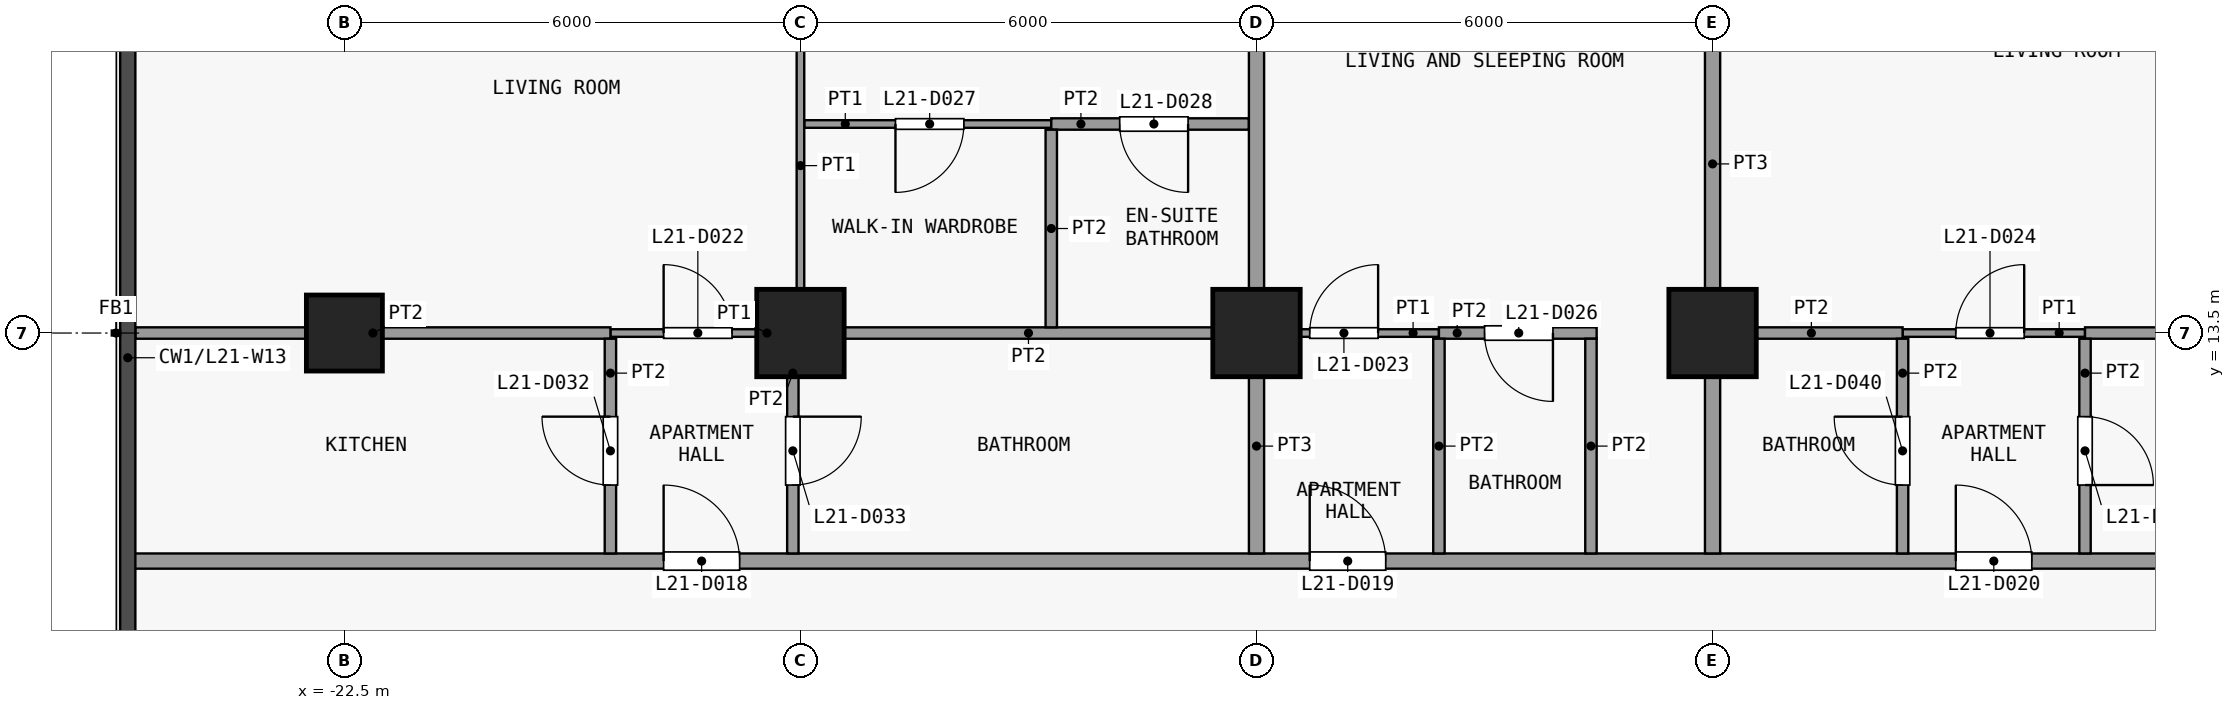
"""IFC4 building model, lengths in metres.
Left out: names, types, materials, properties, quantities, classifications, styles, units other than length and angle.
Written with IfcOpenShell. Run it as: python <this file> out.ifc"""

import sys

from ifc_helpers import new_model, si_unit, direction, frame, frame_2d, origin, origin_2d, place, context, subcontext, project, spatial, rectangle, extrude, element, fill, save


model = new_model("IFC4")
c1 = context("Model", 3, precision=1e-05, world=origin(), true_north=direction((0.0, 1.0)))
c2 = subcontext(c1, "Body", "Model", "MODEL_VIEW")
j1 = project(units=[si_unit("LENGTHUNIT", "METRE"), si_unit("PLANEANGLEUNIT", "RADIAN")], contexts=[c1])
p1 = place(None, origin())
s1 = spatial("IfcSite", under=j1, at=p1, CompositionType="ELEMENT")
p2 = place(p1, origin())
s2 = spatial("IfcBuilding", under=s1, at=p2, CompositionType="ELEMENT")
p3 = place(p2, frame((0.0, 0.0, 88.3)))
s3 = spatial("IfcBuildingStorey", under=s2, at=p3, CompositionType="ELEMENT", Elevation=88.3)
p4 = place(p3, frame((-22.5, 13.5, 0.0), z_axis=(0.0, 0.0, 1.0), x_axis=(1.0, 0.0, 0.0)))
e1 = element("IfcColumn", 1, at=p4, inside=s3, PredefinedType="COLUMN", context=c2, shape_type="SweptSolid", body=[
    extrude(rectangle(XDim=1.0, YDim=1.0, at=origin_2d()), origin(), (0.0, 0.0, 1.0), 3.6),
])
for number, where, z_axis, x_axis in (
    (2, (-16.5, 13.5, 0.0), (0.0, 0.0, 1.0), (1.0, 0.0, 0.0)),
    (3, (-10.5, 13.5, 0.0), (0.0, 0.0, 1.0), (1.0, 0.0, 0.0)),
    (4, (-4.5, 13.5, 0.0), (0.0, 0.0, 1.0), (1.0, 0.0, 0.0)),
):
    element("IfcColumn", number, at=place(p3, frame(where, z_axis=z_axis, x_axis=x_axis)), inside=s3, PredefinedType="COLUMN", context=c2, shape_type="SweptSolid", body=[
        extrude(rectangle(XDim=1.15, YDim=1.15, at=origin_2d()), origin(), (0.0, 0.0, 1.0), 3.6),
    ])
p5 = place(p3, frame((-25.35, 10.5, 0.0), z_axis=(0.0, 0.0, 1.0), x_axis=(1.0, 0.0, 0.0)))
e5 = element("IfcWall", 5, at=p5, inside=s3, PredefinedType="PARTITIONING", context=c2, shape_type="SweptSolid", body=[
    extrude(rectangle(XDim=49.2, YDim=0.2, at=frame_2d((24.6, 0.0))), origin(), (0.0, 0.0, 1.0), 3.3),
])
p6 = place(p5, frame((7.05, 0.0, 0.0)))
e6 = element("IfcOpeningElement", 6, at=p6, cuts=e5, PredefinedType="OPENING", context=c2, shape_type="SweptSolid", body=[
    extrude(rectangle(XDim=1.0, YDim=2.1, at=frame_2d((0.5, 1.05))), frame((0.0, 0.11, 0.0), z_axis=(0.0, -1.0, 0.0), x_axis=(1.0, 0.0, 0.0)), (0.0, 0.0, 1.0), 0.22),
])
p7 = place(p5, frame((15.55, 0.0, 0.0)))
e7 = element("IfcOpeningElement", 7, at=p7, cuts=e5, PredefinedType="OPENING", context=c2, shape_type="SweptSolid", body=[
    extrude(rectangle(XDim=1.0, YDim=2.1, at=frame_2d((0.5, 1.05))), frame((0.0, 0.11, 0.0), z_axis=(0.0, -1.0, 0.0), x_axis=(1.0, 0.0, 0.0)), (0.0, 0.0, 1.0), 0.22),
])
p8 = place(p5, frame((24.05, 0.0, 0.0)))
e8 = element("IfcOpeningElement", 8, at=p8, cuts=e5, PredefinedType="OPENING", context=c2, shape_type="SweptSolid", body=[
    extrude(rectangle(XDim=1.0, YDim=2.1, at=frame_2d((0.5, 1.05))), frame((0.0, 0.11, 0.0), z_axis=(0.0, -1.0, 0.0), x_axis=(1.0, 0.0, 0.0)), (0.0, 0.0, 1.0), 0.22),
])
p9 = place(p5, frame((45.05, 0.0, 0.0)))
e9 = element("IfcOpeningElement", 9, at=p9, cuts=e5, PredefinedType="OPENING", context=c2, shape_type="SweptSolid", body=[
    extrude(rectangle(XDim=1.0, YDim=2.1, at=frame_2d((0.5, 1.05))), frame((0.0, 0.11, 0.0), z_axis=(0.0, -1.0, 0.0), x_axis=(1.0, 0.0, 0.0)), (0.0, 0.0, 1.0), 0.22),
])
p10 = place(p3, frame((-19.0, 13.5, 0.0), z_axis=(0.0, 0.0, 1.0), x_axis=(1.0, 0.0, 0.0)))
e10 = element("IfcWall", 10, at=p10, inside=s3, PredefinedType="PARTITIONING", context=c2, shape_type="SweptSolid", body=[
    extrude(rectangle(XDim=2.4, YDim=0.1, at=frame_2d((1.2, 0.0))), origin(), (0.0, 0.0, 1.0), 3.3),
])
p11 = place(p10, frame((0.7, 0.0, 0.0)))
e11 = element("IfcOpeningElement", 11, at=p11, cuts=e10, PredefinedType="OPENING", context=c2, shape_type="SweptSolid", body=[
    extrude(rectangle(XDim=0.9, YDim=2.1, at=frame_2d((0.45, 1.05))), frame((0.0, 0.06, 0.0), z_axis=(0.0, -1.0, 0.0), x_axis=(1.0, 0.0, 0.0)), (0.0, 0.0, 1.0), 0.12),
])
p12 = place(p3, frame((-10.5, 13.5, 0.0), z_axis=(0.0, 0.0, 1.0), x_axis=(1.0, 0.0, 0.0)))
e12 = element("IfcWall", 12, at=p12, inside=s3, PredefinedType="PARTITIONING", context=c2, shape_type="SweptSolid", body=[
    extrude(rectangle(XDim=2.4, YDim=0.1, at=frame_2d((1.2, 0.0))), origin(), (0.0, 0.0, 1.0), 3.3),
])
p13 = place(p12, frame((0.7, 0.0, 0.0)))
e13 = element("IfcOpeningElement", 13, at=p13, cuts=e12, PredefinedType="OPENING", context=c2, shape_type="SweptSolid", body=[
    extrude(rectangle(XDim=0.9, YDim=2.1, at=frame_2d((0.45, 1.05))), frame((0.0, 0.06, 0.0), z_axis=(0.0, -1.0, 0.0), x_axis=(1.0, 0.0, 0.0)), (0.0, 0.0, 1.0), 0.12),
])
p14 = place(p3, frame((-2.0, 13.5, 0.0), z_axis=(0.0, 0.0, 1.0), x_axis=(1.0, 0.0, 0.0)))
e14 = element("IfcWall", 14, at=p14, inside=s3, PredefinedType="PARTITIONING", context=c2, shape_type="SweptSolid", body=[
    extrude(rectangle(XDim=2.4, YDim=0.1, at=frame_2d((1.2, 0.0))), origin(), (0.0, 0.0, 1.0), 3.3),
])
p15 = place(p14, frame((0.7, 0.0, 0.0)))
e15 = element("IfcOpeningElement", 15, at=p15, cuts=e14, PredefinedType="OPENING", context=c2, shape_type="SweptSolid", body=[
    extrude(rectangle(XDim=0.9, YDim=2.1, at=frame_2d((0.45, 1.05))), frame((0.0, 0.06, 0.0), z_axis=(0.0, -1.0, 0.0), x_axis=(1.0, 0.0, 0.0)), (0.0, 0.0, 1.0), 0.12),
])
p16 = place(p3, frame((-25.25, 13.5, 0.0), z_axis=(0.0, 0.0, 1.0), x_axis=(1.0, 0.0, 0.0)))
e16 = element("IfcWall", 16, at=p16, inside=s3, PredefinedType="PARTITIONING", context=c2, shape_type="SweptSolid", body=[
    extrude(rectangle(XDim=6.25, YDim=0.15, at=frame_2d((3.125, 0.0))), origin(), (0.0, 0.0, 1.0), 3.3),
])
p17 = place(p3, frame((-16.5, 13.5, 0.0), z_axis=(0.0, 0.0, 1.0), x_axis=(1.0, 0.0, 0.0)))
e17 = element("IfcWall", 17, at=p17, inside=s3, PredefinedType="PARTITIONING", context=c2, shape_type="SweptSolid", body=[
    extrude(rectangle(XDim=6.0, YDim=0.15, at=frame_2d((3.0, 0.0))), origin(), (0.0, 0.0, 1.0), 3.3),
])
p18 = place(p3, frame((-8.1, 13.5, 0.0), z_axis=(0.0, 0.0, 1.0), x_axis=(1.0, 0.0, 0.0)))
e18 = element("IfcWall", 18, at=p18, inside=s3, PredefinedType="PARTITIONING", context=c2, shape_type="SweptSolid", body=[
    extrude(rectangle(XDim=2.075, YDim=0.15, at=frame_2d((1.038, 0.0))), origin(), (0.0, 0.0, 1.0), 3.3),
])
p19 = place(p18, frame((0.6, 0.0, 0.0)))
e19 = element("IfcOpeningElement", 19, at=p19, cuts=e18, PredefinedType="OPENING", context=c2, shape_type="SweptSolid", body=[
    extrude(rectangle(XDim=0.9, YDim=2.1, at=frame_2d((0.45, 1.05))), frame((0.0, 0.085, 0.0), z_axis=(0.0, -1.0, 0.0), x_axis=(1.0, 0.0, 0.0)), (0.0, 0.0, 1.0), 0.17),
])
p20 = place(p3, frame((-4.4, 13.5, 0.0), z_axis=(0.0, 0.0, 1.0), x_axis=(1.0, 0.0, 0.0)))
e20 = element("IfcWall", 20, at=p20, inside=s3, PredefinedType="PARTITIONING", context=c2, shape_type="SweptSolid", body=[
    extrude(rectangle(XDim=2.4, YDim=0.15, at=frame_2d((1.2, 0.0))), origin(), (0.0, 0.0, 1.0), 3.3),
])
p21 = place(p3, frame((0.4, 13.5, 0.0), z_axis=(0.0, 0.0, 1.0), x_axis=(1.0, 0.0, 0.0)))
e21 = element("IfcWall", 21, at=p21, inside=s3, PredefinedType="PARTITIONING", context=c2, shape_type="SweptSolid", body=[
    extrude(rectangle(XDim=10.1, YDim=0.15, at=frame_2d((5.05, 0.0))), origin(), (0.0, 0.0, 1.0), 3.3),
])
p22 = place(p3, frame((-16.45, 16.25, 0.0), z_axis=(0.0, 0.0, 1.0), x_axis=(1.0, 0.0, 0.0)))
e22 = element("IfcWall", 22, at=p22, inside=s3, PredefinedType="PARTITIONING", context=c2, shape_type="SweptSolid", body=[
    extrude(rectangle(XDim=3.25, YDim=0.1, at=frame_2d((1.625, 0.0))), origin(), (0.0, 0.0, 1.0), 3.3),
])
p23 = place(p22, frame((1.2, 0.0, 0.0)))
e23 = element("IfcOpeningElement", 23, at=p23, cuts=e22, PredefinedType="OPENING", context=c2, shape_type="SweptSolid", body=[
    extrude(rectangle(XDim=0.9, YDim=2.1, at=frame_2d((0.45, 1.05))), frame((0.0, 0.06, 0.0), z_axis=(0.0, -1.0, 0.0), x_axis=(1.0, 0.0, 0.0)), (0.0, 0.0, 1.0), 0.12),
])
p24 = place(p3, frame((-13.2, 16.25, 0.0), z_axis=(0.0, 0.0, 1.0), x_axis=(1.0, 0.0, 0.0)))
e24 = element("IfcWall", 24, at=p24, inside=s3, PredefinedType="PARTITIONING", context=c2, shape_type="SweptSolid", body=[
    extrude(rectangle(XDim=2.6, YDim=0.15, at=frame_2d((1.3, 0.0))), origin(), (0.0, 0.0, 1.0), 3.3),
])
p25 = place(p24, frame((0.9, 0.0, 0.0)))
e25 = element("IfcOpeningElement", 25, at=p25, cuts=e24, PredefinedType="OPENING", context=c2, shape_type="SweptSolid", body=[
    extrude(rectangle(XDim=0.9, YDim=2.1, at=frame_2d((0.45, 1.05))), frame((0.0, 0.085, 0.0), z_axis=(0.0, -1.0, 0.0), x_axis=(1.0, 0.0, 0.0)), (0.0, 0.0, 1.0), 0.17),
])
p26 = place(p3, frame((-19.0, 10.6, 0.0), z_axis=(0.0, 0.0, 1.0), x_axis=(0.0, 1.0, 0.0)))
e26 = element("IfcWall", 26, at=p26, inside=s3, PredefinedType="PARTITIONING", context=c2, shape_type="SweptSolid", body=[
    extrude(rectangle(XDim=2.825, YDim=0.15, at=frame_2d((1.413, 0.0))), origin(), (0.0, 0.0, 1.0), 3.3),
])
p27 = place(p26, frame((0.9, 0.0, 0.0)))
e27 = element("IfcOpeningElement", 27, at=p27, cuts=e26, PredefinedType="OPENING", context=c2, shape_type="SweptSolid", body=[
    extrude(rectangle(XDim=0.9, YDim=2.1, at=frame_2d((0.45, 1.05))), frame((0.0, 0.085, 0.0), z_axis=(0.0, -1.0, 0.0), x_axis=(1.0, 0.0, 0.0)), (0.0, 0.0, 1.0), 0.17),
])
p28 = place(p3, frame((-16.6, 10.6, 0.0), z_axis=(0.0, 0.0, 1.0), x_axis=(0.0, 1.0, 0.0)))
e28 = element("IfcWall", 28, at=p28, inside=s3, PredefinedType="PARTITIONING", context=c2, shape_type="SweptSolid", body=[
    extrude(rectangle(XDim=2.825, YDim=0.15, at=frame_2d((1.413, 0.0))), origin(), (0.0, 0.0, 1.0), 3.3),
])
p29 = place(p28, frame((0.9, 0.0, 0.0)))
e29 = element("IfcOpeningElement", 29, at=p29, cuts=e28, PredefinedType="OPENING", context=c2, shape_type="SweptSolid", body=[
    extrude(rectangle(XDim=0.9, YDim=2.1, at=frame_2d((0.45, 1.05))), frame((0.0, 0.085, 0.0), z_axis=(0.0, -1.0, 0.0), x_axis=(1.0, 0.0, 0.0)), (0.0, 0.0, 1.0), 0.17),
])
p30 = place(p3, frame((-16.5, 13.575, 0.0), z_axis=(0.0, 0.0, 1.0), x_axis=(0.0, 1.0, 0.0)))
e30 = element("IfcWall", 30, at=p30, inside=s3, PredefinedType="PARTITIONING", context=c2, shape_type="SweptSolid", body=[
    extrude(rectangle(XDim=8.675, YDim=0.1, at=frame_2d((4.337, 0.0))), origin(), (0.0, 0.0, 1.0), 3.3),
])
p31 = place(p30, frame((4.375, 0.0, 0.0)))
e31 = element("IfcOpeningElement", 31, at=p31, cuts=e30, PredefinedType="OPENING", context=c2, shape_type="SweptSolid", body=[
    extrude(rectangle(XDim=0.9, YDim=2.1, at=frame_2d((0.45, 1.05))), frame((0.0, 0.06, 0.0), z_axis=(0.0, -1.0, 0.0), x_axis=(1.0, 0.0, 0.0)), (0.0, 0.0, 1.0), 0.12),
])
p32 = place(p3, frame((-13.2, 13.575, 0.0), z_axis=(0.0, 0.0, 1.0), x_axis=(0.0, 1.0, 0.0)))
e32 = element("IfcWall", 32, at=p32, inside=s3, PredefinedType="PARTITIONING", context=c2, shape_type="SweptSolid", body=[
    extrude(rectangle(XDim=2.6, YDim=0.15, at=frame_2d((1.3, 0.0))), origin(), (0.0, 0.0, 1.0), 3.3),
])
p33 = place(p3, frame((-10.5, 10.6, 0.0), z_axis=(0.0, 0.0, 1.0), x_axis=(0.0, 1.0, 0.0)))
e33 = element("IfcWall", 33, at=p33, inside=s3, PredefinedType="PARTITIONING", context=c2, shape_type="SweptSolid", body=[
    extrude(rectangle(XDim=2.825, YDim=0.2, at=frame_2d((1.413, 0.0))), origin(), (0.0, 0.0, 1.0), 3.3),
])
p34 = place(p3, frame((-10.5, 13.575, 0.0), z_axis=(0.0, 0.0, 1.0), x_axis=(0.0, 1.0, 0.0)))
e34 = element("IfcWall", 34, at=p34, inside=s3, PredefinedType="PARTITIONING", context=c2, shape_type="SweptSolid", body=[
    extrude(rectangle(XDim=8.675, YDim=0.2, at=frame_2d((4.337, 0.0))), origin(), (0.0, 0.0, 1.0), 3.3),
])
for number, where, z_axis, x_axis in (
    (35, (-8.1, 10.6, 0.0), (0.0, 0.0, 1.0), (0.0, 1.0, 0.0)),
    (36, (-6.1, 10.6, 0.0), (0.0, 0.0, 1.0), (0.0, 1.0, 0.0)),
):
    element("IfcWall", number, at=place(p3, frame(where, z_axis=z_axis, x_axis=x_axis)), inside=s3, PredefinedType="PARTITIONING", context=c2, shape_type="SweptSolid", body=[
        extrude(rectangle(XDim=2.825, YDim=0.15, at=frame_2d((1.413, 0.0))), origin(), (0.0, 0.0, 1.0), 3.3),
    ])
p35 = place(p3, frame((-4.5, 10.6, 0.0), z_axis=(0.0, 0.0, 1.0), x_axis=(0.0, 1.0, 0.0)))
e37 = element("IfcWall", 37, at=p35, inside=s3, PredefinedType="PARTITIONING", context=c2, shape_type="SweptSolid", body=[
    extrude(rectangle(XDim=10.25, YDim=0.2, at=frame_2d((5.125, 0.0))), origin(), (0.0, 0.0, 1.0), 3.3),
])
p36 = place(p3, frame((-2.0, 10.6, 0.0), z_axis=(0.0, 0.0, 1.0), x_axis=(0.0, 1.0, 0.0)))
e38 = element("IfcWall", 38, at=p36, inside=s3, PredefinedType="PARTITIONING", context=c2, shape_type="SweptSolid", body=[
    extrude(rectangle(XDim=2.825, YDim=0.15, at=frame_2d((1.413, 0.0))), origin(), (0.0, 0.0, 1.0), 3.3),
])
p37 = place(p36, frame((0.9, 0.0, 0.0)))
e39 = element("IfcOpeningElement", 39, at=p37, cuts=e38, PredefinedType="OPENING", context=c2, shape_type="SweptSolid", body=[
    extrude(rectangle(XDim=0.9, YDim=2.1, at=frame_2d((0.45, 1.05))), frame((0.0, 0.085, 0.0), z_axis=(0.0, -1.0, 0.0), x_axis=(1.0, 0.0, 0.0)), (0.0, 0.0, 1.0), 0.17),
])
p38 = place(p3, frame((0.4, 10.6, 0.0), z_axis=(0.0, 0.0, 1.0), x_axis=(0.0, 1.0, 0.0)))
e40 = element("IfcWall", 40, at=p38, inside=s3, PredefinedType="PARTITIONING", context=c2, shape_type="SweptSolid", body=[
    extrude(rectangle(XDim=2.825, YDim=0.15, at=frame_2d((1.413, 0.0))), origin(), (0.0, 0.0, 1.0), 3.3),
])
p39 = place(p38, frame((0.9, 0.0, 0.0)))
e41 = element("IfcOpeningElement", 41, at=p39, cuts=e40, PredefinedType="OPENING", context=c2, shape_type="SweptSolid", body=[
    extrude(rectangle(XDim=0.9, YDim=2.1, at=frame_2d((0.45, 1.05))), frame((0.0, 0.085, 0.0), z_axis=(0.0, -1.0, 0.0), x_axis=(1.0, 0.0, 0.0)), (0.0, 0.0, 1.0), 0.17),
])
p40 = place(p6, origin())
e42 = element("IfcDoor", 42, at=p40, inside=s3, OperationType="SINGLE_SWING_RIGHT", PredefinedType="DOOR", context=c2, shape_type="SweptSolid", body=[
    extrude(rectangle(XDim=1.0, YDim=2.1, at=frame_2d((0.5, 1.05))), frame((0.0, 0.025, 0.0), z_axis=(0.0, -1.0, 0.0), x_axis=(1.0, 0.0, 0.0)), (0.0, 0.0, 1.0), 0.05),
])
fill(e6, e42)
p41 = place(p7, origin())
e43 = element("IfcDoor", 43, at=p41, inside=s3, OperationType="SINGLE_SWING_RIGHT", PredefinedType="DOOR", context=c2, shape_type="SweptSolid", body=[
    extrude(rectangle(XDim=1.0, YDim=2.1, at=frame_2d((0.5, 1.05))), frame((0.0, 0.025, 0.0), z_axis=(0.0, -1.0, 0.0), x_axis=(1.0, 0.0, 0.0)), (0.0, 0.0, 1.0), 0.05),
])
fill(e7, e43)
p42 = place(p8, origin())
e44 = element("IfcDoor", 44, at=p42, inside=s3, OperationType="SINGLE_SWING_RIGHT", PredefinedType="DOOR", context=c2, shape_type="SweptSolid", body=[
    extrude(rectangle(XDim=1.0, YDim=2.1, at=frame_2d((0.5, 1.05))), frame((0.0, 0.025, 0.0), z_axis=(0.0, -1.0, 0.0), x_axis=(1.0, 0.0, 0.0)), (0.0, 0.0, 1.0), 0.05),
])
fill(e8, e44)
p43 = place(p11, origin())
e45 = element("IfcDoor", 45, at=p43, inside=s3, OperationType="SINGLE_SWING_RIGHT", PredefinedType="DOOR", context=c2, shape_type="SweptSolid", body=[
    extrude(rectangle(XDim=0.9, YDim=2.1, at=frame_2d((0.45, 1.05))), frame((0.0, 0.025, 0.0), z_axis=(0.0, -1.0, 0.0), x_axis=(1.0, 0.0, 0.0)), (0.0, 0.0, 1.0), 0.05),
])
fill(e11, e45)
p44 = place(p13, origin())
e46 = element("IfcDoor", 46, at=p44, inside=s3, OperationType="SINGLE_SWING_LEFT", PredefinedType="DOOR", context=c2, shape_type="SweptSolid", body=[
    extrude(rectangle(XDim=0.9, YDim=2.1, at=frame_2d((0.45, 1.05))), frame((0.0, 0.025, 0.0), z_axis=(0.0, -1.0, 0.0), x_axis=(1.0, 0.0, 0.0)), (0.0, 0.0, 1.0), 0.05),
])
fill(e13, e46)
p45 = place(p15, origin())
e47 = element("IfcDoor", 47, at=p45, inside=s3, OperationType="SINGLE_SWING_LEFT", PredefinedType="DOOR", context=c2, shape_type="SweptSolid", body=[
    extrude(rectangle(XDim=0.9, YDim=2.1, at=frame_2d((0.45, 1.05))), frame((0.0, 0.025, 0.0), z_axis=(0.0, -1.0, 0.0), x_axis=(1.0, 0.0, 0.0)), (0.0, 0.0, 1.0), 0.05),
])
fill(e15, e47)
p46 = place(p19, origin())
e48 = element("IfcDoor", 48, at=p46, inside=s3, OperationType="SINGLE_SWING_RIGHT", PredefinedType="DOOR", context=c2, shape_type="SweptSolid", body=[
    extrude(rectangle(XDim=0.9, YDim=2.1, at=frame_2d((0.45, 1.05))), frame((0.0, 0.025, 0.0), z_axis=(0.0, -1.0, 0.0), x_axis=(1.0, 0.0, 0.0)), (0.0, 0.0, 1.0), 0.05),
])
fill(e19, e48)
p47 = place(p23, origin())
e49 = element("IfcDoor", 49, at=p47, inside=s3, OperationType="SINGLE_SWING_LEFT", PredefinedType="DOOR", context=c2, shape_type="SweptSolid", body=[
    extrude(rectangle(XDim=0.9, YDim=2.1, at=frame_2d((0.45, 1.05))), frame((0.0, 0.025, 0.0), z_axis=(0.0, -1.0, 0.0), x_axis=(1.0, 0.0, 0.0)), (0.0, 0.0, 1.0), 0.05),
])
fill(e23, e49)
p48 = place(p25, origin())
e50 = element("IfcDoor", 50, at=p48, inside=s3, OperationType="SINGLE_SWING_RIGHT", PredefinedType="DOOR", context=c2, shape_type="SweptSolid", body=[
    extrude(rectangle(XDim=0.9, YDim=2.1, at=frame_2d((0.45, 1.05))), frame((0.0, 0.025, 0.0), z_axis=(0.0, -1.0, 0.0), x_axis=(1.0, 0.0, 0.0)), (0.0, 0.0, 1.0), 0.05),
])
fill(e25, e50)
p49 = place(p27, origin())
e51 = element("IfcDoor", 51, at=p49, inside=s3, OperationType="SINGLE_SWING_LEFT", PredefinedType="DOOR", context=c2, shape_type="SweptSolid", body=[
    extrude(rectangle(XDim=0.9, YDim=2.1, at=frame_2d((0.45, 1.05))), frame((0.0, 0.025, 0.0), z_axis=(0.0, -1.0, 0.0), x_axis=(1.0, 0.0, 0.0)), (0.0, 0.0, 1.0), 0.05),
])
fill(e27, e51)
p50 = place(p29, origin())
e52 = element("IfcDoor", 52, at=p50, inside=s3, OperationType="SINGLE_SWING_RIGHT", PredefinedType="DOOR", context=c2, shape_type="SweptSolid", body=[
    extrude(rectangle(XDim=0.9, YDim=2.1, at=frame_2d((0.45, 1.05))), frame((0.0, 0.025, 0.0), z_axis=(0.0, -1.0, 0.0), x_axis=(1.0, 0.0, 0.0)), (0.0, 0.0, 1.0), 0.05),
])
fill(e29, e52)
p51 = place(p37, origin())
e53 = element("IfcDoor", 53, at=p51, inside=s3, OperationType="SINGLE_SWING_LEFT", PredefinedType="DOOR", context=c2, shape_type="SweptSolid", body=[
    extrude(rectangle(XDim=0.9, YDim=2.1, at=frame_2d((0.45, 1.05))), frame((0.0, 0.025, 0.0), z_axis=(0.0, -1.0, 0.0), x_axis=(1.0, 0.0, 0.0)), (0.0, 0.0, 1.0), 0.05),
])
fill(e39, e53)
p52 = place(p39, origin())
e54 = element("IfcDoor", 54, at=p52, inside=s3, OperationType="SINGLE_SWING_LEFT", PredefinedType="DOOR", context=c2, shape_type="SweptSolid", body=[
    extrude(rectangle(XDim=0.9, YDim=2.1, at=frame_2d((0.45, 1.05))), frame((0.0, 0.025, 0.0), z_axis=(0.0, -1.0, 0.0), x_axis=(1.0, 0.0, 0.0)), (0.0, 0.0, 1.0), 0.05),
])
fill(e41, e54)
save(model, sys.argv[1])
